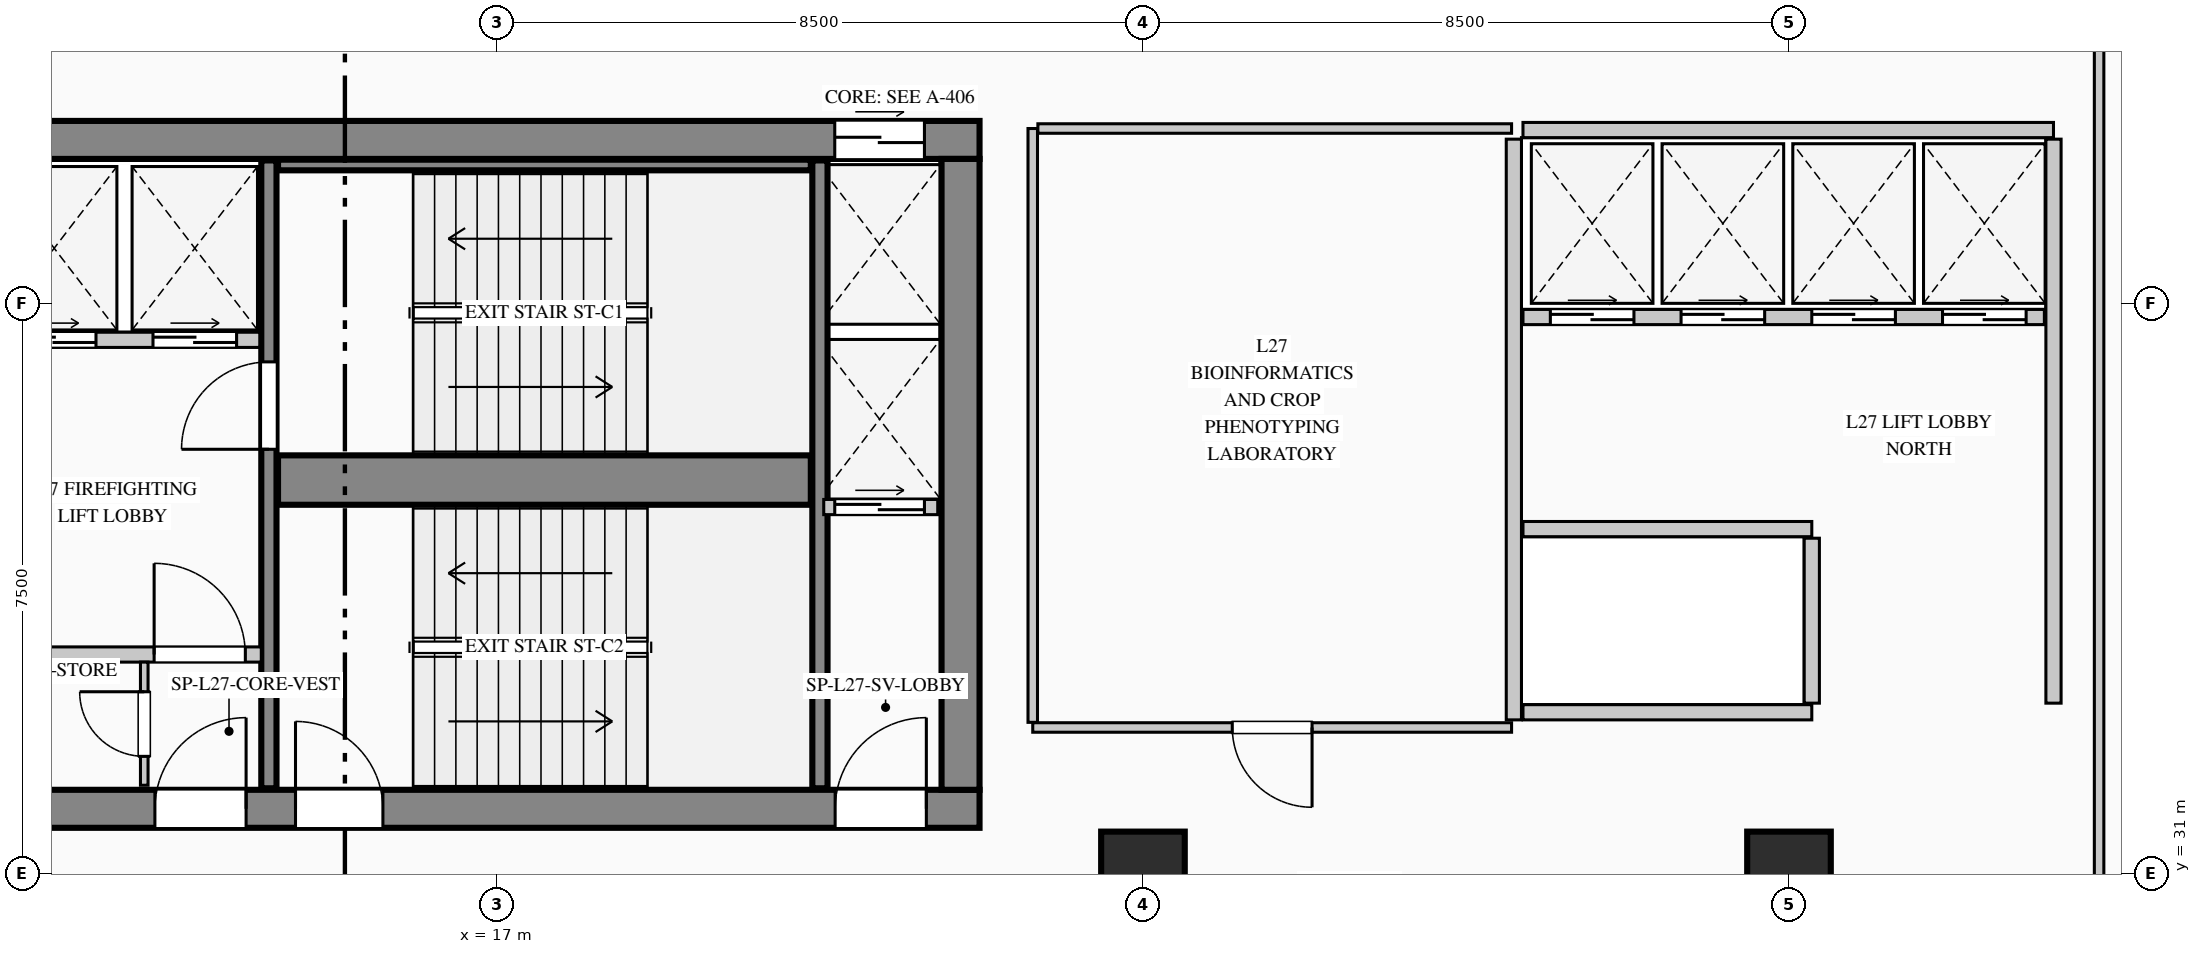
"""IFC4 building model, lengths in metres.
Left out: names, types, materials, properties, quantities, classifications, styles, units other than length and angle.
Written with IfcOpenShell. Run it as: python <this file> out.ifc"""

import sys

from ifc_helpers import new_model, si_unit, direction, frame, frame_2d, origin, origin_2d, place, context, subcontext, project, spatial, rectangle, extrude, element, fill, save


model = new_model("IFC4")
c1 = context("Model", 3, precision=1e-05, world=origin(), true_north=direction((0.0, 1.0)))
c2 = subcontext(c1, "Body", "Model", "MODEL_VIEW")
j1 = project(units=[si_unit("LENGTHUNIT", "METRE"), si_unit("PLANEANGLEUNIT", "RADIAN")], contexts=[c1])
p1 = place(None, origin())
s1 = spatial("IfcSite", under=j1, at=p1, CompositionType="ELEMENT")
p2 = place(p1, origin())
s2 = spatial("IfcBuilding", under=s1, at=p2, CompositionType="ELEMENT")
p3 = place(p2, frame((0.0, 0.0, 119.3)))
s3 = spatial("IfcBuildingStorey", under=s2, at=p3, CompositionType="ELEMENT", Elevation=119.3)
p4 = place(p3, frame((5.5, 40.65, 0.0), z_axis=(0.0, 0.0, 1.0), x_axis=(1.0, 0.0, 0.0)))
e1 = element("IfcWall", 1, at=p4, inside=s3, PredefinedType="SHEAR", context=c2, shape_type="SweptSolid", body=[
    extrude(rectangle(XDim=17.85, YDim=0.5, at=frame_2d((8.925, 0.0))), origin(), (0.0, 0.0, 1.0), 3.95),
])
p5 = place(p4, frame((15.945, 0.0, 0.0)))
e2 = element("IfcOpeningElement", 2, at=p5, cuts=e1, PredefinedType="OPENING", context=c2, shape_type="SweptSolid", body=[
    extrude(rectangle(XDim=1.18, YDim=2.25, at=frame_2d((0.59, 1.125))), frame((0.0, 0.26, 0.0), z_axis=(0.0, -1.0, 0.0), x_axis=(1.0, 0.0, 0.0)), (0.0, 0.0, 1.0), 0.52),
])
p6 = place(p3, frame((5.5, 31.85, 0.0), z_axis=(0.0, 0.0, 1.0), x_axis=(1.0, 0.0, 0.0)))
e3 = element("IfcWall", 3, at=p6, inside=s3, PredefinedType="SHEAR", context=c2, shape_type="SweptSolid", body=[
    extrude(rectangle(XDim=17.85, YDim=0.5, at=frame_2d((8.925, 0.0))), origin(), (0.0, 0.0, 1.0), 3.95),
])
p7 = place(p6, frame((3.15, 0.0, 0.0)))
e4 = element("IfcOpeningElement", 4, at=p7, cuts=e3, PredefinedType="OPENING", context=c2, shape_type="SweptSolid", body=[
    extrude(rectangle(XDim=1.2, YDim=2.2, at=frame_2d((0.6, 1.1))), frame((0.0, 0.26, 0.0), z_axis=(0.0, -1.0, 0.0), x_axis=(1.0, 0.0, 0.0)), (0.0, 0.0, 1.0), 0.52),
])
p8 = place(p6, frame((7.0, 0.0, 0.0)))
e5 = element("IfcOpeningElement", 5, at=p8, cuts=e3, PredefinedType="OPENING", context=c2, shape_type="SweptSolid", body=[
    extrude(rectangle(XDim=1.2, YDim=2.2, at=frame_2d((0.6, 1.1))), frame((0.0, 0.26, 0.0), z_axis=(0.0, -1.0, 0.0), x_axis=(1.0, 0.0, 0.0)), (0.0, 0.0, 1.0), 0.52),
])
p9 = place(p6, frame((8.85, 0.0, 0.0)))
e6 = element("IfcOpeningElement", 6, at=p9, cuts=e3, PredefinedType="OPENING", context=c2, shape_type="SweptSolid", body=[
    extrude(rectangle(XDim=1.15, YDim=2.2, at=frame_2d((0.575, 1.1))), frame((0.0, 0.26, 0.0), z_axis=(0.0, -1.0, 0.0), x_axis=(1.0, 0.0, 0.0)), (0.0, 0.0, 1.0), 0.52),
])
p10 = place(p6, frame((15.95, 0.0, 0.0)))
e7 = element("IfcOpeningElement", 7, at=p10, cuts=e3, PredefinedType="OPENING", context=c2, shape_type="SweptSolid", body=[
    extrude(rectangle(XDim=1.2, YDim=2.2, at=frame_2d((0.6, 1.1))), frame((0.0, 0.26, 0.0), z_axis=(0.0, -1.0, 0.0), x_axis=(1.0, 0.0, 0.0)), (0.0, 0.0, 1.0), 0.52),
])
p11 = place(p3, frame((23.1, 32.1, 0.0), z_axis=(0.0, 0.0, 1.0), x_axis=(0.0, 1.0, 0.0)))
e8 = element("IfcWall", 8, at=p11, inside=s3, PredefinedType="SHEAR", context=c2, shape_type="SweptSolid", body=[
    extrude(rectangle(XDim=8.3, YDim=0.5, at=frame_2d((4.15, 0.0))), origin(), (0.0, 0.0, 1.0), 3.95),
])
p12 = place(p3, frame((14.0, 32.12, 0.0), z_axis=(0.0, 0.0, 1.0), x_axis=(0.0, 1.0, 0.0)))
e9 = element("IfcWall", 9, at=p12, inside=s3, PredefinedType="SHEAR", context=c2, shape_type="SweptSolid", body=[
    extrude(rectangle(XDim=8.26, YDim=0.2, at=frame_2d((4.13, 0.0))), origin(), (0.0, 0.0, 1.0), 3.95),
])
p13 = place(p12, frame((4.46, 0.0, 0.0)))
e10 = element("IfcOpeningElement", 10, at=p13, cuts=e9, PredefinedType="OPENING", context=c2, shape_type="SweptSolid", body=[
    extrude(rectangle(XDim=1.15, YDim=2.2, at=frame_2d((0.575, 1.1))), frame((0.0, 0.11, 0.0), z_axis=(0.0, -1.0, 0.0), x_axis=(1.0, 0.0, 0.0)), (0.0, 0.0, 1.0), 0.22),
])
p14 = place(p3, frame((14.12, 36.175, 0.0), z_axis=(0.0, 0.0, 1.0), x_axis=(1.0, 0.0, 0.0)))
e11 = element("IfcWall", 11, at=p14, inside=s3, PredefinedType="SHEAR", context=c2, shape_type="SweptSolid", body=[
    extrude(rectangle(XDim=7.01, YDim=0.65, at=frame_2d((3.505, 0.0))), origin(), (0.0, 0.0, 1.0), 3.95),
])
p15 = place(p3, frame((21.25, 32.12, 0.0), z_axis=(0.0, 0.0, 1.0), x_axis=(0.0, 1.0, 0.0)))
e12 = element("IfcWall", 12, at=p15, inside=s3, PredefinedType="SHEAR", context=c2, shape_type="SweptSolid", body=[
    extrude(rectangle(XDim=8.26, YDim=0.2, at=frame_2d((4.13, 0.0))), origin(), (0.0, 0.0, 1.0), 3.95),
])
p16 = place(p3, frame((14.12, 40.32, 0.0), z_axis=(0.0, 0.0, 1.0), x_axis=(1.0, 0.0, 0.0)))
e13 = element("IfcWall", 13, at=p16, inside=s3, PredefinedType="SHEAR", context=c2, shape_type="SweptSolid", body=[
    extrude(rectangle(XDim=7.01, YDim=0.14, at=frame_2d((3.505, 0.0))), origin(), (0.0, 0.0, 1.0), 3.95),
])
for number, where, z_axis, x_axis in (
    (14, (25.5, 31.0, 0.0), (0.0, 0.0, 1.0), (1.0, 0.0, 0.0)),
    (15, (34.0, 31.0, 0.0), (0.0, 0.0, 1.0), (1.0, 0.0, 0.0)),
):
    element("IfcColumn", number, at=place(p3, frame(where, z_axis=z_axis, x_axis=x_axis)), inside=s3, PredefinedType="COLUMN", context=c2, shape_type="SweptSolid", body=[
        extrude(rectangle(XDim=1.1, YDim=1.1, at=origin_2d()), origin(), (0.0, 0.0, 1.0), 3.95),
    ])
p17 = place(p3, frame((10.34, 38.02, 0.0), z_axis=(0.0, 0.0, 1.0), x_axis=(1.0, 0.0, 0.0)))
e16 = element("IfcWall", 16, at=p17, inside=s3, PredefinedType="PARTITIONING", context=c2, shape_type="SweptSolid", body=[
    extrude(rectangle(XDim=3.54, YDim=0.2, at=frame_2d((1.77, 0.0))), origin(), (0.0, 0.0, 1.0), 3.69),
])
p18 = place(p17, frame((0.285, 0.0, 0.0)))
e17 = element("IfcOpeningElement", 17, at=p18, cuts=e16, PredefinedType="OPENING", context=c2, shape_type="SweptSolid", body=[
    extrude(rectangle(XDim=1.1, YDim=2.2, at=frame_2d((0.55, 1.1))), frame((0.0, 0.11, 0.0), z_axis=(0.0, -1.0, 0.0), x_axis=(1.0, 0.0, 0.0)), (0.0, 0.0, 1.0), 0.22),
])
p19 = place(p17, frame((2.135, 0.0, 0.0)))
e18 = element("IfcOpeningElement", 18, at=p19, cuts=e16, PredefinedType="OPENING", context=c2, shape_type="SweptSolid", body=[
    extrude(rectangle(XDim=1.1, YDim=2.2, at=frame_2d((0.55, 1.1))), frame((0.0, 0.11, 0.0), z_axis=(0.0, -1.0, 0.0), x_axis=(1.0, 0.0, 0.0)), (0.0, 0.0, 1.0), 0.22),
])
p20 = place(p3, frame((10.34, 33.88, 0.0), z_axis=(0.0, 0.0, 1.0), x_axis=(1.0, 0.0, 0.0)))
e19 = element("IfcWall", 19, at=p20, inside=s3, PredefinedType="PARTITIONING", context=c2, shape_type="SweptSolid", body=[
    extrude(rectangle(XDim=3.56, YDim=0.2, at=frame_2d((1.78, 0.0))), origin(), (0.0, 0.0, 1.0), 3.69),
])
p21 = place(p20, frame((2.15, 0.0, 0.0)))
e20 = element("IfcOpeningElement", 20, at=p21, cuts=e19, PredefinedType="OPENING", context=c2, shape_type="SweptSolid", body=[
    extrude(rectangle(XDim=1.2, YDim=2.2, at=frame_2d((0.6, 1.1))), frame((0.0, 0.11, 0.0), z_axis=(0.0, -1.0, 0.0), x_axis=(1.0, 0.0, 0.0)), (0.0, 0.0, 1.0), 0.22),
])
p22 = place(p3, frame((12.36, 32.16, 0.0), z_axis=(0.0, 0.0, 1.0), x_axis=(0.0, 1.0, 0.0)))
e21 = element("IfcWall", 21, at=p22, inside=s3, PredefinedType="PARTITIONING", context=c2, shape_type="SweptSolid", body=[
    extrude(rectangle(XDim=1.62, YDim=0.1, at=frame_2d((0.81, 0.0))), origin(), (0.0, 0.0, 1.0), 3.69),
])
p23 = place(p22, frame((0.38, 0.0, 0.0)))
e22 = element("IfcOpeningElement", 22, at=p23, cuts=e21, PredefinedType="OPENING", context=c2, shape_type="SweptSolid", body=[
    extrude(rectangle(XDim=0.85, YDim=2.1, at=frame_2d((0.425, 1.05))), frame((0.0, 0.06, 0.0), z_axis=(0.0, -1.0, 0.0), x_axis=(1.0, 0.0, 0.0)), (0.0, 0.0, 1.0), 0.12),
])
p24 = place(p3, frame((21.3, 35.82, 0.0), z_axis=(0.0, 0.0, 1.0), x_axis=(1.0, 0.0, 0.0)))
e23 = element("IfcWall", 23, at=p24, inside=s3, PredefinedType="PARTITIONING", context=c2, shape_type="SweptSolid", body=[
    extrude(rectangle(XDim=1.5, YDim=0.2, at=frame_2d((0.75, 0.0))), origin(), (0.0, 0.0, 1.0), 3.69),
])
p25 = place(p24, frame((0.145, 0.0, 0.0)))
e24 = element("IfcOpeningElement", 24, at=p25, cuts=e23, PredefinedType="OPENING", context=c2, shape_type="SweptSolid", body=[
    extrude(rectangle(XDim=1.18, YDim=2.25, at=frame_2d((0.59, 1.125))), frame((0.0, 0.11, 0.0), z_axis=(0.0, -1.0, 0.0), x_axis=(1.0, 0.0, 0.0)), (0.0, 0.0, 1.0), 0.22),
])
p26 = place(p3, frame((30.38, 33.02, 0.0), z_axis=(0.0, 0.0, 1.0), x_axis=(0.0, 1.0, 0.0)))
e25 = element("IfcWall", 25, at=p26, inside=s3, PredefinedType="PARTITIONING", context=c2, shape_type="SweptSolid", body=[
    extrude(rectangle(XDim=7.64, YDim=0.2, at=frame_2d((3.82, 0.0))), origin(), (0.0, 0.0, 1.0), 3.69),
])
p27 = place(p3, frame((30.5, 40.78, 0.0), z_axis=(0.0, 0.0, 1.0), x_axis=(1.0, 0.0, 0.0)))
e26 = element("IfcWall", 26, at=p27, inside=s3, PredefinedType="PARTITIONING", context=c2, shape_type="SweptSolid", body=[
    extrude(rectangle(XDim=6.98, YDim=0.2, at=frame_2d((3.49, 0.0))), origin(), (0.0, 0.0, 1.0), 3.69),
])
p28 = place(p3, frame((37.48, 33.24, 0.0), z_axis=(0.0, 0.0, 1.0), x_axis=(0.0, 1.0, 0.0)))
e27 = element("IfcWall", 27, at=p28, inside=s3, PredefinedType="PARTITIONING", context=c2, shape_type="SweptSolid", body=[
    extrude(rectangle(XDim=7.42, YDim=0.2, at=frame_2d((3.71, 0.0))), origin(), (0.0, 0.0, 1.0), 3.69),
])
p29 = place(p3, frame((30.5, 38.32, 0.0), z_axis=(0.0, 0.0, 1.0), x_axis=(1.0, 0.0, 0.0)))
e28 = element("IfcWall", 28, at=p29, inside=s3, PredefinedType="PARTITIONING", context=c2, shape_type="SweptSolid", body=[
    extrude(rectangle(XDim=6.86, YDim=0.2, at=frame_2d((3.43, 0.0))), origin(), (0.0, 0.0, 1.0), 3.69),
])
p30 = place(p29, frame((0.36, 0.0, 0.0)))
e29 = element("IfcOpeningElement", 29, at=p30, cuts=e28, PredefinedType="OPENING", context=c2, shape_type="SweptSolid", body=[
    extrude(rectangle(XDim=1.1, YDim=2.2, at=frame_2d((0.55, 1.1))), frame((0.0, 0.11, 0.0), z_axis=(0.0, -1.0, 0.0), x_axis=(1.0, 0.0, 0.0)), (0.0, 0.0, 1.0), 0.22),
])
p31 = place(p29, frame((2.08, 0.0, 0.0)))
e30 = element("IfcOpeningElement", 30, at=p31, cuts=e28, PredefinedType="OPENING", context=c2, shape_type="SweptSolid", body=[
    extrude(rectangle(XDim=1.1, YDim=2.2, at=frame_2d((0.55, 1.1))), frame((0.0, 0.11, 0.0), z_axis=(0.0, -1.0, 0.0), x_axis=(1.0, 0.0, 0.0)), (0.0, 0.0, 1.0), 0.22),
])
p32 = place(p29, frame((3.8, 0.0, 0.0)))
e31 = element("IfcOpeningElement", 31, at=p32, cuts=e28, PredefinedType="OPENING", context=c2, shape_type="SweptSolid", body=[
    extrude(rectangle(XDim=1.1, YDim=2.2, at=frame_2d((0.55, 1.1))), frame((0.0, 0.11, 0.0), z_axis=(0.0, -1.0, 0.0), x_axis=(1.0, 0.0, 0.0)), (0.0, 0.0, 1.0), 0.22),
])
p33 = place(p29, frame((5.52, 0.0, 0.0)))
e32 = element("IfcOpeningElement", 32, at=p33, cuts=e28, PredefinedType="OPENING", context=c2, shape_type="SweptSolid", body=[
    extrude(rectangle(XDim=1.1, YDim=2.2, at=frame_2d((0.55, 1.1))), frame((0.0, 0.11, 0.0), z_axis=(0.0, -1.0, 0.0), x_axis=(1.0, 0.0, 0.0)), (0.0, 0.0, 1.0), 0.22),
])
for number, where, z_axis, x_axis in (
    (33, (30.5, 35.53, 0.0), (0.0, 0.0, 1.0), (1.0, 0.0, 0.0)),
    (34, (30.5, 33.12, 0.0), (0.0, 0.0, 1.0), (1.0, 0.0, 0.0)),
):
    element("IfcWall", number, at=place(p3, frame(where, z_axis=z_axis, x_axis=x_axis)), inside=s3, PredefinedType="PARTITIONING", context=c2, shape_type="SweptSolid", body=[
        extrude(rectangle(XDim=3.8, YDim=0.2, at=frame_2d((1.9, 0.0))), origin(), (0.0, 0.0, 1.0), 3.69),
    ])
p34 = place(p3, frame((34.3, 33.24, 0.0), z_axis=(0.0, 0.0, 1.0), x_axis=(0.0, 1.0, 0.0)))
e35 = element("IfcWall", 35, at=p34, inside=s3, PredefinedType="PARTITIONING", context=c2, shape_type="SweptSolid", body=[
    extrude(rectangle(XDim=2.17, YDim=0.2, at=frame_2d((1.085, 0.0))), origin(), (0.0, 0.0, 1.0), 3.69),
])
p35 = place(p3, frame((30.35, 32.92, 0.0), z_axis=(0.0, 0.0, 1.0), x_axis=(-1.0, 0.0, 0.0)))
e36 = element("IfcWall", 36, at=p35, inside=s3, PredefinedType="PARTITIONING", context=c2, shape_type="SweptSolid", body=[
    extrude(rectangle(XDim=6.3, YDim=0.125, at=frame_2d((3.15, 0.0))), origin(), (0.0, 0.0, 1.0), 3.69),
])
p36 = place(p35, frame((2.625, 0.0, 0.0)))
e37 = element("IfcOpeningElement", 37, at=p36, cuts=e36, PredefinedType="OPENING", context=c2, shape_type="SweptSolid", body=[
    extrude(rectangle(XDim=1.05, YDim=2.15, at=frame_2d((0.525, 1.075))), frame((0.0, 0.073, 0.0), z_axis=(0.0, -1.0, 0.0), x_axis=(1.0, 0.0, 0.0)), (0.0, 0.0, 1.0), 0.145),
])
p37 = place(p3, frame((24.05, 32.988, 0.0), z_axis=(0.0, 0.0, 1.0), x_axis=(0.0, 1.0, 0.0)))
e38 = element("IfcWall", 38, at=p37, inside=s3, PredefinedType="PARTITIONING", context=c2, shape_type="SweptSolid", body=[
    extrude(rectangle(XDim=7.812, YDim=0.125, at=frame_2d((3.906, 0.0))), origin(), (0.0, 0.0, 1.0), 3.69),
])
p38 = place(p3, frame((24.117, 40.8, 0.0), z_axis=(0.0, 0.0, 1.0), x_axis=(1.0, 0.0, 0.0)))
e39 = element("IfcWall", 39, at=p38, inside=s3, PredefinedType="PARTITIONING", context=c2, shape_type="SweptSolid", body=[
    extrude(rectangle(XDim=6.233, YDim=0.125, at=frame_2d((3.116, 0.0))), origin(), (0.0, 0.0, 1.0), 3.69),
])
p39 = place(p3, frame((38.08, 28.698, 0.0), z_axis=(0.0, 0.0, 1.0), x_axis=(0.0, 1.0, 0.0)))
e40 = element("IfcWall", 40, at=p39, inside=s3, PredefinedType="PARTITIONING", context=c2, shape_type="SweptSolid", body=[
    extrude(rectangle(XDim=14.475, YDim=0.125, at=frame_2d((7.238, 0.0))), origin(), (0.0, 0.0, 1.0), 3.69),
])
p40 = place(p8, origin())
e41 = element("IfcDoor", 41, at=p40, inside=s3, OperationType="SINGLE_SWING_RIGHT", PredefinedType="DOOR", context=c2, shape_type="SweptSolid", body=[
    extrude(rectangle(XDim=1.2, YDim=2.2, at=frame_2d((0.6, 1.1))), frame((0.0, 0.025, 0.0), z_axis=(0.0, -1.0, 0.0), x_axis=(1.0, 0.0, 0.0)), (0.0, 0.0, 1.0), 0.05),
])
fill(e5, e41)
p41 = place(p9, origin())
e42 = element("IfcDoor", 42, at=p41, inside=s3, OperationType="SINGLE_SWING_LEFT", PredefinedType="DOOR", context=c2, shape_type="SweptSolid", body=[
    extrude(rectangle(XDim=1.15, YDim=2.2, at=frame_2d((0.575, 1.1))), frame((0.0, 0.025, 0.0), z_axis=(0.0, -1.0, 0.0), x_axis=(1.0, 0.0, 0.0)), (0.0, 0.0, 1.0), 0.05),
])
fill(e6, e42)
p42 = place(p10, origin())
e43 = element("IfcDoor", 43, at=p42, inside=s3, OperationType="SINGLE_SWING_RIGHT", PredefinedType="DOOR", context=c2, shape_type="SweptSolid", body=[
    extrude(rectangle(XDim=1.2, YDim=2.2, at=frame_2d((0.6, 1.1))), frame((0.0, 0.025, 0.0), z_axis=(0.0, -1.0, 0.0), x_axis=(1.0, 0.0, 0.0)), (0.0, 0.0, 1.0), 0.05),
])
fill(e7, e43)
p43 = place(p21, origin())
e44 = element("IfcDoor", 44, at=p43, inside=s3, OperationType="SINGLE_SWING_LEFT", PredefinedType="DOOR", context=c2, shape_type="SweptSolid", body=[
    extrude(rectangle(XDim=1.2, YDim=2.2, at=frame_2d((0.6, 1.1))), frame((0.0, 0.025, 0.0), z_axis=(0.0, -1.0, 0.0), x_axis=(1.0, 0.0, 0.0)), (0.0, 0.0, 1.0), 0.05),
])
fill(e20, e44)
p44 = place(p23, origin())
e45 = element("IfcDoor", 45, at=p44, inside=s3, OperationType="SINGLE_SWING_RIGHT", PredefinedType="DOOR", context=c2, shape_type="SweptSolid", body=[
    extrude(rectangle(XDim=0.85, YDim=2.1, at=frame_2d((0.425, 1.05))), frame((0.0, 0.025, 0.0), z_axis=(0.0, -1.0, 0.0), x_axis=(1.0, 0.0, 0.0)), (0.0, 0.0, 1.0), 0.05),
])
fill(e22, e45)
p45 = place(p13, origin())
e46 = element("IfcDoor", 46, at=p45, inside=s3, OperationType="SINGLE_SWING_LEFT", PredefinedType="DOOR", context=c2, shape_type="SweptSolid", body=[
    extrude(rectangle(XDim=1.15, YDim=2.2, at=frame_2d((0.575, 1.1))), frame((0.0, 0.025, 0.0), z_axis=(0.0, -1.0, 0.0), x_axis=(1.0, 0.0, 0.0)), (0.0, 0.0, 1.0), 0.05),
])
fill(e10, e46)
p46 = place(p18, origin())
e47 = element("IfcDoor", 47, at=p46, inside=s3, OperationType="DOUBLE_DOOR_SLIDING", PredefinedType="DOOR", context=c2, shape_type="SweptSolid", body=[
    extrude(rectangle(XDim=1.1, YDim=2.2, at=frame_2d((0.55, 1.1))), frame((0.0, 0.025, 0.0), z_axis=(0.0, -1.0, 0.0), x_axis=(1.0, 0.0, 0.0)), (0.0, 0.0, 1.0), 0.05),
])
fill(e17, e47)
p47 = place(p19, origin())
e48 = element("IfcDoor", 48, at=p47, inside=s3, OperationType="DOUBLE_DOOR_SLIDING", PredefinedType="DOOR", context=c2, shape_type="SweptSolid", body=[
    extrude(rectangle(XDim=1.1, YDim=2.2, at=frame_2d((0.55, 1.1))), frame((0.0, 0.025, 0.0), z_axis=(0.0, -1.0, 0.0), x_axis=(1.0, 0.0, 0.0)), (0.0, 0.0, 1.0), 0.05),
])
fill(e18, e48)
p48 = place(p5, origin())
e49 = element("IfcDoor", 49, at=p48, inside=s3, OperationType="DOUBLE_DOOR_SLIDING", PredefinedType="DOOR", context=c2, shape_type="SweptSolid", body=[
    extrude(rectangle(XDim=1.18, YDim=2.25, at=frame_2d((0.59, 1.125))), frame((0.0, 0.025, 0.0), z_axis=(0.0, -1.0, 0.0), x_axis=(1.0, 0.0, 0.0)), (0.0, 0.0, 1.0), 0.05),
])
fill(e2, e49)
p49 = place(p25, origin())
e50 = element("IfcDoor", 50, at=p49, inside=s3, OperationType="DOUBLE_DOOR_SLIDING", PredefinedType="DOOR", context=c2, shape_type="SweptSolid", body=[
    extrude(rectangle(XDim=1.18, YDim=2.25, at=frame_2d((0.59, 1.125))), frame((0.0, 0.025, 0.0), z_axis=(0.0, -1.0, 0.0), x_axis=(1.0, 0.0, 0.0)), (0.0, 0.0, 1.0), 0.05),
])
fill(e24, e50)
p50 = place(p30, origin())
e51 = element("IfcDoor", 51, at=p50, inside=s3, OperationType="DOUBLE_DOOR_SLIDING", PredefinedType="DOOR", context=c2, shape_type="SweptSolid", body=[
    extrude(rectangle(XDim=1.1, YDim=2.2, at=frame_2d((0.55, 1.1))), frame((0.0, 0.025, 0.0), z_axis=(0.0, -1.0, 0.0), x_axis=(1.0, 0.0, 0.0)), (0.0, 0.0, 1.0), 0.05),
])
fill(e29, e51)
p51 = place(p31, origin())
e52 = element("IfcDoor", 52, at=p51, inside=s3, OperationType="DOUBLE_DOOR_SLIDING", PredefinedType="DOOR", context=c2, shape_type="SweptSolid", body=[
    extrude(rectangle(XDim=1.1, YDim=2.2, at=frame_2d((0.55, 1.1))), frame((0.0, 0.025, 0.0), z_axis=(0.0, -1.0, 0.0), x_axis=(1.0, 0.0, 0.0)), (0.0, 0.0, 1.0), 0.05),
])
fill(e30, e52)
p52 = place(p32, origin())
e53 = element("IfcDoor", 53, at=p52, inside=s3, OperationType="DOUBLE_DOOR_SLIDING", PredefinedType="DOOR", context=c2, shape_type="SweptSolid", body=[
    extrude(rectangle(XDim=1.1, YDim=2.2, at=frame_2d((0.55, 1.1))), frame((0.0, 0.025, 0.0), z_axis=(0.0, -1.0, 0.0), x_axis=(1.0, 0.0, 0.0)), (0.0, 0.0, 1.0), 0.05),
])
fill(e31, e53)
p53 = place(p33, origin())
e54 = element("IfcDoor", 54, at=p53, inside=s3, OperationType="DOUBLE_DOOR_SLIDING", PredefinedType="DOOR", context=c2, shape_type="SweptSolid", body=[
    extrude(rectangle(XDim=1.1, YDim=2.2, at=frame_2d((0.55, 1.1))), frame((0.0, 0.025, 0.0), z_axis=(0.0, -1.0, 0.0), x_axis=(1.0, 0.0, 0.0)), (0.0, 0.0, 1.0), 0.05),
])
fill(e32, e54)
p54 = place(p36, origin())
e55 = element("IfcDoor", 55, at=p54, inside=s3, OperationType="SINGLE_SWING_LEFT", PredefinedType="DOOR", context=c2, shape_type="SweptSolid", body=[
    extrude(rectangle(XDim=1.05, YDim=2.15, at=frame_2d((0.525, 1.075))), frame((0.0, 0.025, 0.0), z_axis=(0.0, -1.0, 0.0), x_axis=(1.0, 0.0, 0.0)), (0.0, 0.0, 1.0), 0.05),
])
fill(e37, e55)
save(model, sys.argv[1])
